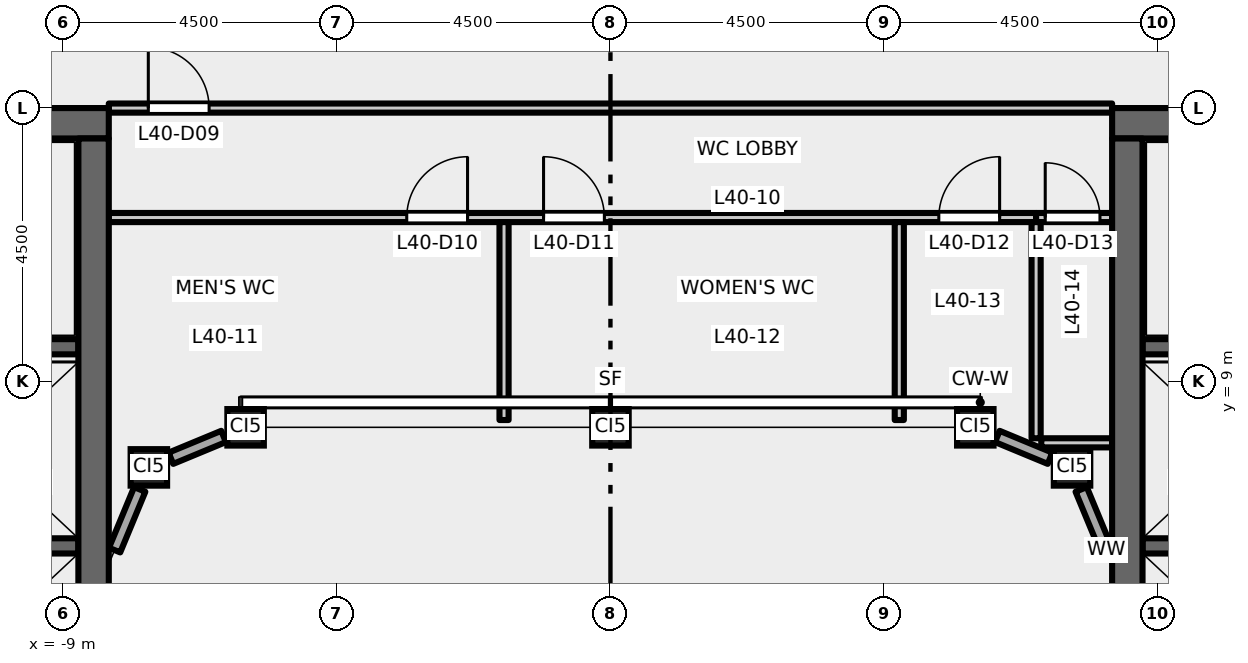
"""IFC4 building model, lengths in metres.
Left out: names, types, materials, properties, quantities, classifications, styles, units other than length and angle.
Written with IfcOpenShell. Run it as: python <this file> out.ifc"""

import sys

from ifc_helpers import new_model, si_unit, direction, frame, frame_2d, origin, origin_2d, place, context, subcontext, project, spatial, rectangle, hollow_rectangle, extrude, element, fill, save


model = new_model("IFC4")
c1 = context("Model", 3, precision=1e-05, world=origin(), true_north=direction((0.0, 1.0)))
c2 = subcontext(c1, "Body", "Model", "MODEL_VIEW")
j1 = project(units=[si_unit("LENGTHUNIT", "METRE"), si_unit("PLANEANGLEUNIT", "RADIAN")], contexts=[c1])
p1 = place(None, origin())
s1 = spatial("IfcSite", under=j1, at=p1, CompositionType="ELEMENT")
p2 = place(p1, origin())
s2 = spatial("IfcBuilding", under=s1, at=p2, CompositionType="ELEMENT")
p3 = place(p2, frame((0.0, 0.0, 187.2)))
s3 = spatial("IfcBuildingStorey", under=s2, at=p3, CompositionType="ELEMENT", Elevation=187.2)
for number, where, z_axis, x_axis in (
    (1, (-7.591, 7.591, 0.0), (0.0, 0.0, 1.0), (1.0, 0.0, 0.0)),
    (2, (-6.0, 8.25, 0.0), (0.0, 0.0, 1.0), (1.0, 0.0, 0.0)),
    (3, (0.0, 8.25, 0.0), (0.0, 0.0, 1.0), (1.0, 0.0, 0.0)),
    (4, (6.0, 8.25, 0.0), (0.0, 0.0, 1.0), (1.0, 0.0, 0.0)),
    (5, (7.591, 7.591, 0.0), (0.0, 0.0, 1.0), (1.0, 0.0, 0.0)),
):
    element("IfcColumn", number, at=place(p3, frame(where, z_axis=z_axis, x_axis=x_axis)), inside=s3, PredefinedType="COLUMN", context=c2, shape_type="SweptSolid", body=[
        extrude(hollow_rectangle(XDim=0.6, YDim=0.6, WallThickness=0.032, at=origin_2d()), origin(), (0.0, 0.0, 1.0), 5.5),
    ])
p4 = place(p3, frame((-8.75, 6.3, 0.0), z_axis=(0.0, 0.0, 1.0), x_axis=(-1.0, 0.0, 0.0)))
e6 = element("IfcWall", 6, at=p4, inside=s3, PredefinedType="SHEAR", context=c2, shape_type="SweptSolid", body=[
    extrude(rectangle(XDim=3.1, YDim=0.25, at=frame_2d((1.55, 0.0))), origin(), (0.0, 0.0, 1.0), 5.35),
])
p5 = place(p3, frame((-8.75, 9.575, 0.0), z_axis=(0.0, 0.0, 1.0), x_axis=(-1.0, 0.0, 0.0)))
e7 = element("IfcWall", 7, at=p5, inside=s3, PredefinedType="SHEAR", context=c2, shape_type="SweptSolid", body=[
    extrude(rectangle(XDim=8.0, YDim=0.25, at=frame_2d((4.0, 0.0))), origin(), (0.0, 0.0, 1.0), 5.35),
])
p6 = place(p5, frame((6.65, 0.0, 0.0)))
e8 = element("IfcOpeningElement", 8, at=p6, cuts=e7, PredefinedType="OPENING", context=c2, shape_type="SweptSolid", body=[
    extrude(rectangle(XDim=1.1, YDim=2.1, at=frame_2d((0.55, 1.05))), frame((0.0, 0.135, 0.0), z_axis=(0.0, -1.0, 0.0), x_axis=(1.0, 0.0, 0.0)), (0.0, 0.0, 1.0), 0.27),
])
p7 = place(p3, frame((-8.25, 13.25, 0.0), z_axis=(0.0, 0.0, 1.0), x_axis=(-1.0, 0.0, 0.0)))
e9 = element("IfcWall", 9, at=p7, inside=s3, PredefinedType="SHEAR", context=c2, shape_type="SweptSolid", body=[
    extrude(rectangle(XDim=13.5, YDim=0.5, at=frame_2d((6.75, 0.0))), origin(), (0.0, 0.0, 1.0), 5.35),
])
p8 = place(p3, frame((-8.5, -13.0, 0.0), z_axis=(0.0, 0.0, 1.0), x_axis=(0.0, 1.0, 0.0)))
e10 = element("IfcWall", 10, at=p8, inside=s3, PredefinedType="SHEAR", context=c2, shape_type="SweptSolid", body=[
    extrude(rectangle(XDim=26.0, YDim=0.5, at=frame_2d((13.0, 0.0))), origin(), (0.0, 0.0, 1.0), 5.35),
])
p9 = place(p3, frame((8.75, 6.3, 0.0), z_axis=(0.0, 0.0, 1.0), x_axis=(1.0, 0.0, 0.0)))
e11 = element("IfcWall", 11, at=p9, inside=s3, PredefinedType="SHEAR", context=c2, shape_type="SweptSolid", body=[
    extrude(rectangle(XDim=3.1, YDim=0.25, at=frame_2d((1.55, 0.0))), origin(), (0.0, 0.0, 1.0), 5.35),
])
p10 = place(p3, frame((8.75, 9.575, 0.0), z_axis=(0.0, 0.0, 1.0), x_axis=(1.0, 0.0, 0.0)))
e12 = element("IfcWall", 12, at=p10, inside=s3, PredefinedType="SHEAR", context=c2, shape_type="SweptSolid", body=[
    extrude(rectangle(XDim=8.0, YDim=0.25, at=frame_2d((4.0, 0.0))), origin(), (0.0, 0.0, 1.0), 5.35),
])
p11 = place(p10, frame((6.65, 0.0, 0.0)))
e13 = element("IfcOpeningElement", 13, at=p11, cuts=e12, PredefinedType="OPENING", context=c2, shape_type="SweptSolid", body=[
    extrude(rectangle(XDim=1.1, YDim=2.1, at=frame_2d((0.55, 1.05))), frame((0.0, 0.135, 0.0), z_axis=(0.0, -1.0, 0.0), x_axis=(1.0, 0.0, 0.0)), (0.0, 0.0, 1.0), 0.27),
])
p12 = place(p3, frame((8.25, 13.25, 0.0), z_axis=(0.0, 0.0, 1.0), x_axis=(1.0, 0.0, 0.0)))
e14 = element("IfcWall", 14, at=p12, inside=s3, PredefinedType="SHEAR", context=c2, shape_type="SweptSolid", body=[
    extrude(rectangle(XDim=13.5, YDim=0.5, at=frame_2d((6.75, 0.0))), origin(), (0.0, 0.0, 1.0), 5.35),
])
p13 = place(p3, frame((8.5, -13.0, 0.0), z_axis=(0.0, 0.0, 1.0), x_axis=(0.0, 1.0, 0.0)))
e15 = element("IfcWall", 15, at=p13, inside=s3, PredefinedType="SHEAR", context=c2, shape_type="SweptSolid", body=[
    extrude(rectangle(XDim=26.0, YDim=0.5, at=frame_2d((13.0, 0.0))), origin(), (0.0, 0.0, 1.0), 5.35),
])
p14 = place(p3, frame((8.154, 6.231, 0.0), z_axis=(0.0, 0.0, 1.0), x_axis=(-0.382704496366, 0.923870807235, 0.0)))
e16 = element("IfcWall", 16, at=p14, inside=s3, PredefinedType="STANDARD", context=c2, shape_type="SweptSolid", body=[
    extrude(rectangle(XDim=1.08, YDim=0.2, at=frame_2d((0.54, 0.0))), origin(), (0.0, 0.0, 1.0), 4.918),
])
for number, where, z_axis, x_axis in (
    (17, (7.229, 7.741, 0.0), (0.0, 0.0, 1.0), (-0.924, 0.383, 0.0)),
    (18, (-6.362, 8.1, 0.0), (0.0, 0.0, 1.0), (-0.924, -0.383, 0.0)),
):
    element("IfcWall", number, at=place(p3, frame(where, z_axis=z_axis, x_axis=x_axis)), inside=s3, PredefinedType="STANDARD", context=c2, shape_type="SweptSolid", body=[
        extrude(rectangle(XDim=0.938, YDim=0.2, at=frame_2d((0.469, 0.0))), origin(), (0.0, 0.0, 1.0), 4.918),
    ])
p15 = place(p3, frame((-7.741, 7.229, 0.0), z_axis=(0.0, 0.0, 1.0), x_axis=(-0.382704496366, -0.923870807235, 0.0)))
e19 = element("IfcWall", 19, at=p15, inside=s3, PredefinedType="STANDARD", context=c2, shape_type="SweptSolid", body=[
    extrude(rectangle(XDim=1.08, YDim=0.2, at=frame_2d((0.54, 0.0))), origin(), (0.0, 0.0, 1.0), 4.918),
])
p16 = place(p3, frame((7.085, 7.995, 0.0), z_axis=(0.0, 0.0, 1.0), x_axis=(1.0, 0.0, 0.0)))
e20 = element("IfcWall", 20, at=p16, inside=s3, PredefinedType="PARTITIONING", context=c2, shape_type="SweptSolid", body=[
    extrude(rectangle(XDim=1.165, YDim=0.15, at=frame_2d((0.583, 0.0))), origin(), (0.0, 0.0, 1.0), 5.35),
])
p17 = place(p3, frame((-8.25, 11.7, 0.0), z_axis=(0.0, 0.0, 1.0), x_axis=(1.0, 0.0, 0.0)))
e21 = element("IfcWall", 21, at=p17, inside=s3, PredefinedType="PARTITIONING", context=c2, shape_type="SweptSolid", body=[
    extrude(rectangle(XDim=15.25, YDim=0.15, at=frame_2d((7.625, 0.0))), origin(), (0.0, 0.0, 1.0), 5.35),
])
p18 = place(p17, frame((4.9, 0.0, 0.0)))
e22 = element("IfcOpeningElement", 22, at=p18, cuts=e21, PredefinedType="OPENING", context=c2, shape_type="SweptSolid", body=[
    extrude(rectangle(XDim=1.0, YDim=2.1, at=frame_2d((0.5, 1.05))), frame((0.0, 0.085, 0.0), z_axis=(0.0, -1.0, 0.0), x_axis=(1.0, 0.0, 0.0)), (0.0, 0.0, 1.0), 0.17),
])
p19 = place(p17, frame((7.15, 0.0, 0.0)))
e23 = element("IfcOpeningElement", 23, at=p19, cuts=e21, PredefinedType="OPENING", context=c2, shape_type="SweptSolid", body=[
    extrude(rectangle(XDim=1.0, YDim=2.1, at=frame_2d((0.5, 1.05))), frame((0.0, 0.085, 0.0), z_axis=(0.0, -1.0, 0.0), x_axis=(1.0, 0.0, 0.0)), (0.0, 0.0, 1.0), 0.17),
])
p20 = place(p17, frame((13.65, 0.0, 0.0)))
e24 = element("IfcOpeningElement", 24, at=p20, cuts=e21, PredefinedType="OPENING", context=c2, shape_type="SweptSolid", body=[
    extrude(rectangle(XDim=1.0, YDim=2.1, at=frame_2d((0.5, 1.05))), frame((0.0, 0.085, 0.0), z_axis=(0.0, -1.0, 0.0), x_axis=(1.0, 0.0, 0.0)), (0.0, 0.0, 1.0), 0.17),
])
p21 = place(p3, frame((7.0, 11.7, 0.0), z_axis=(0.0, 0.0, 1.0), x_axis=(1.0, 0.0, 0.0)))
e25 = element("IfcWall", 25, at=p21, inside=s3, PredefinedType="PARTITIONING", context=c2, shape_type="SweptSolid", body=[
    extrude(rectangle(XDim=1.25, YDim=0.15, at=frame_2d((0.625, 0.0))), origin(), (0.0, 0.0, 1.0), 5.35),
])
p22 = place(p21, frame((0.15, 0.0, 0.0)))
e26 = element("IfcOpeningElement", 26, at=p22, cuts=e25, PredefinedType="OPENING", context=c2, shape_type="SweptSolid", body=[
    extrude(rectangle(XDim=0.9, YDim=2.1, at=frame_2d((0.45, 1.05))), frame((0.0, 0.085, 0.0), z_axis=(0.0, -1.0, 0.0), x_axis=(1.0, 0.0, 0.0)), (0.0, 0.0, 1.0), 0.17),
])
p23 = place(p3, frame((-8.25, 13.5, 0.0), z_axis=(0.0, 0.0, 1.0), x_axis=(1.0, 0.0, 0.0)))
e27 = element("IfcWall", 27, at=p23, inside=s3, PredefinedType="PARTITIONING", context=c2, shape_type="SweptSolid", body=[
    extrude(rectangle(XDim=16.5, YDim=0.15, at=frame_2d((8.25, 0.0))), origin(), (0.0, 0.0, 1.0), 5.35),
])
p24 = place(p23, frame((0.65, 0.0, 0.0)))
e28 = element("IfcOpeningElement", 28, at=p24, cuts=e27, PredefinedType="OPENING", context=c2, shape_type="SweptSolid", body=[
    extrude(rectangle(XDim=1.0, YDim=2.1, at=frame_2d((0.5, 1.05))), frame((0.0, 0.085, 0.0), z_axis=(0.0, -1.0, 0.0), x_axis=(1.0, 0.0, 0.0)), (0.0, 0.0, 1.0), 0.17),
])
for number, where, z_axis, x_axis in (
    (29, (-1.75, 8.37, 0.0), (0.0, 0.0, 1.0), (0.0, 1.0, 0.0)),
    (30, (4.75, 8.37, 0.0), (0.0, 0.0, 1.0), (0.0, 1.0, 0.0)),
):
    element("IfcWall", number, at=place(p3, frame(where, z_axis=z_axis, x_axis=x_axis)), inside=s3, PredefinedType="PARTITIONING", context=c2, shape_type="SweptSolid", body=[
        extrude(rectangle(XDim=3.255, YDim=0.15, at=frame_2d((1.627, 0.0))), origin(), (0.0, 0.0, 1.0), 5.35),
    ])
p25 = place(p3, frame((7.0, 8.07, 0.0), z_axis=(0.0, 0.0, 1.0), x_axis=(0.0, 1.0, 0.0)))
e31 = element("IfcWall", 31, at=p25, inside=s3, PredefinedType="PARTITIONING", context=c2, shape_type="SweptSolid", body=[
    extrude(rectangle(XDim=3.555, YDim=0.15, at=frame_2d((1.777, 0.0))), origin(), (0.0, 0.0, 1.0), 5.35),
])
p26 = place(p24, origin())
e32 = element("IfcDoor", 32, at=p26, inside=s3, OperationType="SINGLE_SWING_LEFT", PredefinedType="DOOR", context=c2, shape_type="SweptSolid", body=[
    extrude(rectangle(XDim=1.0, YDim=2.1, at=frame_2d((0.5, 1.05))), frame((0.0, 0.025, 0.0), z_axis=(0.0, -1.0, 0.0), x_axis=(1.0, 0.0, 0.0)), (0.0, 0.0, 1.0), 0.05),
])
fill(e28, e32)
p27 = place(p18, origin())
e33 = element("IfcDoor", 33, at=p27, inside=s3, OperationType="SINGLE_SWING_RIGHT", PredefinedType="DOOR", context=c2, shape_type="SweptSolid", body=[
    extrude(rectangle(XDim=1.0, YDim=2.1, at=frame_2d((0.5, 1.05))), frame((0.0, 0.025, 0.0), z_axis=(0.0, -1.0, 0.0), x_axis=(1.0, 0.0, 0.0)), (0.0, 0.0, 1.0), 0.05),
])
fill(e22, e33)
p28 = place(p19, origin())
e34 = element("IfcDoor", 34, at=p28, inside=s3, OperationType="SINGLE_SWING_LEFT", PredefinedType="DOOR", context=c2, shape_type="SweptSolid", body=[
    extrude(rectangle(XDim=1.0, YDim=2.1, at=frame_2d((0.5, 1.05))), frame((0.0, 0.025, 0.0), z_axis=(0.0, -1.0, 0.0), x_axis=(1.0, 0.0, 0.0)), (0.0, 0.0, 1.0), 0.05),
])
fill(e23, e34)
p29 = place(p20, origin())
e35 = element("IfcDoor", 35, at=p29, inside=s3, OperationType="SINGLE_SWING_RIGHT", PredefinedType="DOOR", context=c2, shape_type="SweptSolid", body=[
    extrude(rectangle(XDim=1.0, YDim=2.1, at=frame_2d((0.5, 1.05))), frame((0.0, 0.025, 0.0), z_axis=(0.0, -1.0, 0.0), x_axis=(1.0, 0.0, 0.0)), (0.0, 0.0, 1.0), 0.05),
])
fill(e24, e35)
p30 = place(p22, origin())
e36 = element("IfcDoor", 36, at=p30, inside=s3, OperationType="SINGLE_SWING_LEFT", PredefinedType="DOOR", context=c2, shape_type="SweptSolid", body=[
    extrude(rectangle(XDim=0.9, YDim=2.1, at=frame_2d((0.45, 1.05))), frame((0.0, 0.025, 0.0), z_axis=(0.0, -1.0, 0.0), x_axis=(1.0, 0.0, 0.0)), (0.0, 0.0, 1.0), 0.05),
])
fill(e26, e36)
save(model, sys.argv[1])
